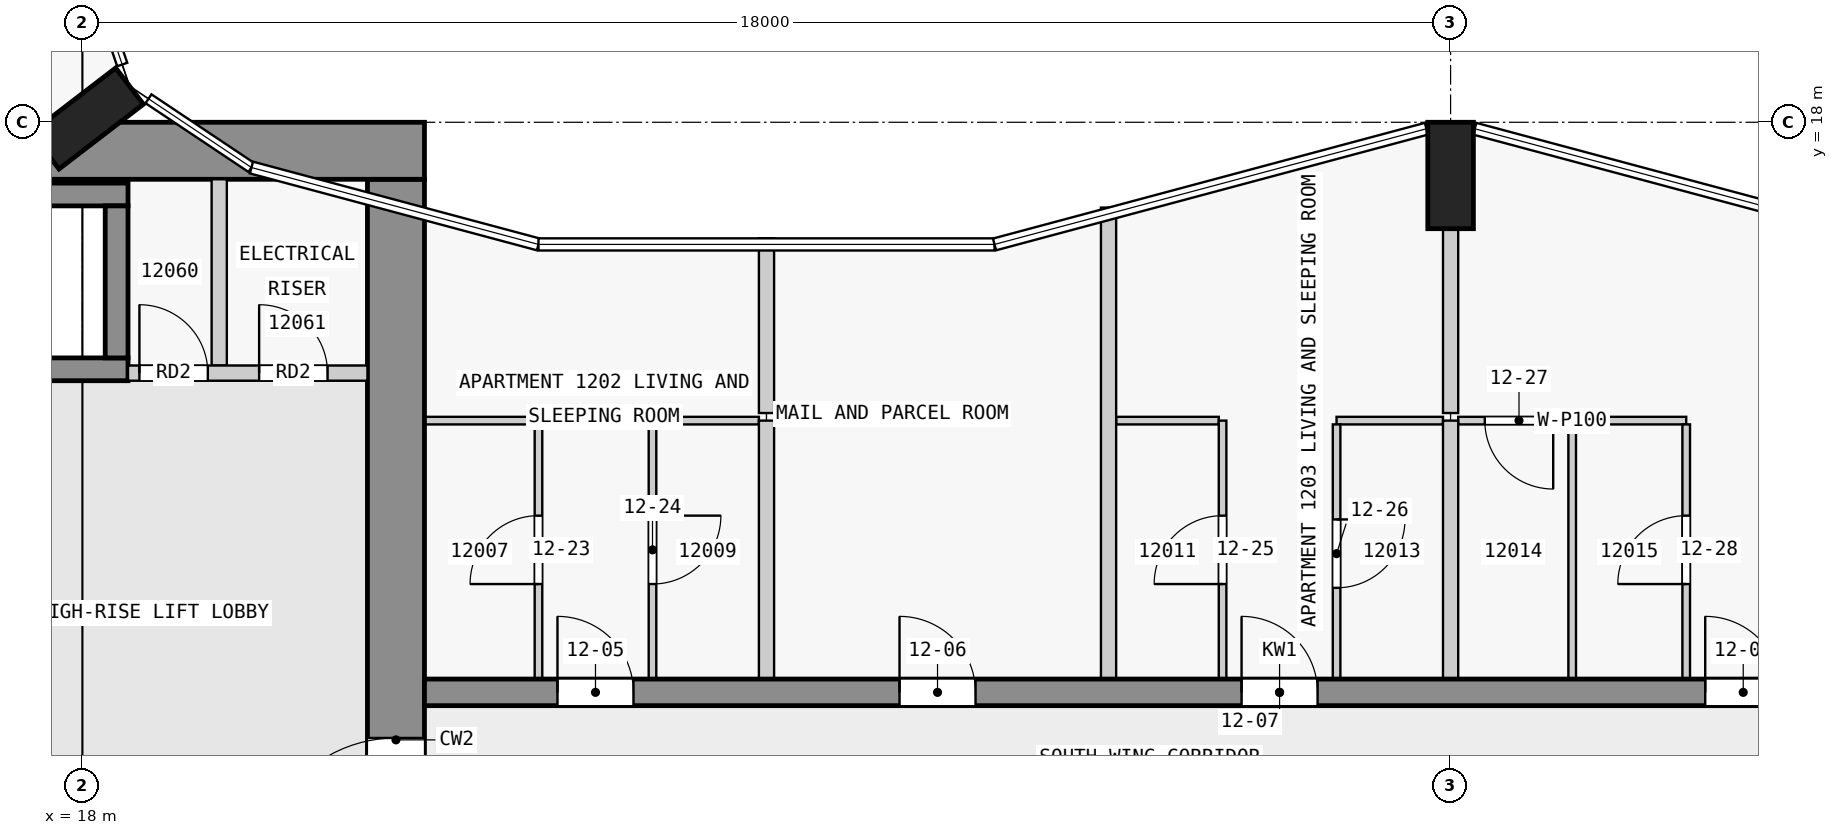
"""IFC4 building model, lengths in metres.
Left out: names, types, materials, properties, quantities, classifications, styles, units other than length and angle.
Written with IfcOpenShell. Run it as: python <this file> out.ifc"""

import sys

from ifc_helpers import new_model, si_unit, direction, frame, frame_2d, origin, origin_2d, place, context, subcontext, project, spatial, rectangle, extrude, element, fill, save


model = new_model("IFC4")
c1 = context("Model", 3, precision=1e-05, world=origin(), true_north=direction((0.0, 1.0)))
c2 = subcontext(c1, "Body", "Model", "MODEL_VIEW")
j1 = project(units=[si_unit("LENGTHUNIT", "METRE"), si_unit("PLANEANGLEUNIT", "RADIAN")], contexts=[c1])
p1 = place(None, origin())
s1 = spatial("IfcSite", under=j1, at=p1, CompositionType="ELEMENT")
p2 = place(p1, origin())
s2 = spatial("IfcBuilding", under=s1, at=p2, CompositionType="ELEMENT")
p3 = place(p2, frame((0.0, 0.0, 51.3)))
s3 = spatial("IfcBuildingStorey", under=s2, at=p3, CompositionType="ELEMENT", Elevation=51.3)
for number, where, z_axis, x_axis in (
    (1, (36.0, 17.3, 0.0), (0.0, 0.0, 1.0), (1.0, 0.0, 0.0)),
    (2, (18.065, 18.05, 0.0), (0.0, 0.0, 1.0), (-0.609, 0.793, 0.0)),
):
    element("IfcColumn", number, at=place(p3, frame(where, z_axis=z_axis, x_axis=x_axis)), inside=s3, PredefinedType="COLUMN", context=c2, shape_type="SweptSolid", body=[
        extrude(rectangle(XDim=0.6, YDim=1.4, at=origin_2d()), origin(), (0.0, 0.0, 1.0), 3.5),
    ])
p4 = place(p3, frame((1.55, 17.625, 0.0), z_axis=(0.0, 0.0, 1.0), x_axis=(1.0, 0.0, 0.0)))
e3 = element("IfcWall", 3, at=p4, inside=s3, PredefinedType="SHEAR", context=c2, shape_type="SweptSolid", body=[
    extrude(rectangle(XDim=20.95, YDim=0.75, at=frame_2d((10.475, 0.0))), origin(), (0.0, 0.0, 1.0), 3.25),
])
p5 = place(p4, frame((6.55, 0.0, 0.0)))
e4 = element("IfcOpeningElement", 4, at=p5, cuts=e3, PredefinedType="OPENING", context=c2, shape_type="SweptSolid", body=[
    extrude(rectangle(XDim=1.8, YDim=2.1, at=frame_2d((0.9, 1.05))), frame((0.0, 0.385, 0.0), z_axis=(0.0, -1.0, 0.0), x_axis=(1.0, 0.0, 0.0)), (0.0, 0.0, 1.0), 0.77),
])
p6 = place(p3, frame((22.125, 2.5, 0.0), z_axis=(0.0, 0.0, 1.0), x_axis=(0.0, 1.0, 0.0)))
e5 = element("IfcWall", 5, at=p6, inside=s3, PredefinedType="SHEAR", context=c2, shape_type="SweptSolid", body=[
    extrude(rectangle(XDim=14.75, YDim=0.75, at=frame_2d((7.375, 0.0))), origin(), (0.0, 0.0, 1.0), 3.25),
])
p7 = place(p6, frame((5.6, 0.0, 0.0)))
e6 = element("IfcOpeningElement", 6, at=p7, cuts=e5, PredefinedType="OPENING", context=c2, shape_type="SweptSolid", body=[
    extrude(rectangle(XDim=1.8, YDim=2.1, at=frame_2d((0.9, 1.05))), frame((0.0, 0.385, 0.0), z_axis=(0.0, -1.0, 0.0), x_axis=(1.0, 0.0, 0.0)), (0.0, 0.0, 1.0), 0.77),
])
for number, where, z_axis, x_axis in (
    (7, (10.8, 17.05, 0.0), (0.0, 0.0, 1.0), (1.0, 0.0, 0.0)),
    (8, (10.8, 14.75, 0.0), (0.0, 0.0, 1.0), (1.0, 0.0, 0.0)),
):
    element("IfcWall", number, at=place(p3, frame(where, z_axis=z_axis, x_axis=x_axis)), inside=s3, PredefinedType="SHEAR", context=c2, shape_type="SweptSolid", body=[
        extrude(rectangle(XDim=7.8, YDim=0.3, at=frame_2d((3.9, 0.0))), origin(), (0.0, 0.0, 1.0), 3.25),
    ])
p8 = place(p3, frame((18.45, 14.9, 0.0), z_axis=(0.0, 0.0, 1.0), x_axis=(0.0, 1.0, 0.0)))
e9 = element("IfcWall", 9, at=p8, inside=s3, PredefinedType="SHEAR", context=c2, shape_type="SweptSolid", body=[
    extrude(rectangle(XDim=2.0, YDim=0.3, at=frame_2d((1.0, 0.0))), origin(), (0.0, 0.0, 1.0), 3.25),
])
p9 = place(p3, frame((22.5, 10.5, 0.0), z_axis=(0.0, 0.0, 1.0), x_axis=(1.0, 0.0, 0.0)))
e10 = element("IfcWall", 10, at=p9, inside=s3, PredefinedType="SHEAR", context=c2, shape_type="SweptSolid", body=[
    extrude(rectangle(XDim=22.5, YDim=0.35, at=frame_2d((11.25, 0.0))), origin(), (0.0, 0.0, 1.0), 3.25),
])
p10 = place(p9, frame((1.75, 0.0, 0.0)))
e11 = element("IfcOpeningElement", 11, at=p10, cuts=e10, PredefinedType="OPENING", context=c2, shape_type="SweptSolid", body=[
    extrude(rectangle(XDim=1.0, YDim=2.1, at=frame_2d((0.5, 1.05))), frame((0.0, 0.185, 0.0), z_axis=(0.0, -1.0, 0.0), x_axis=(1.0, 0.0, 0.0)), (0.0, 0.0, 1.0), 0.37),
])
p11 = place(p9, frame((6.25, 0.0, 0.0)))
e12 = element("IfcOpeningElement", 12, at=p11, cuts=e10, PredefinedType="OPENING", context=c2, shape_type="SweptSolid", body=[
    extrude(rectangle(XDim=1.0, YDim=2.1, at=frame_2d((0.5, 1.05))), frame((0.0, 0.185, 0.0), z_axis=(0.0, -1.0, 0.0), x_axis=(1.0, 0.0, 0.0)), (0.0, 0.0, 1.0), 0.37),
])
p12 = place(p9, frame((10.75, 0.0, 0.0)))
e13 = element("IfcOpeningElement", 13, at=p12, cuts=e10, PredefinedType="OPENING", context=c2, shape_type="SweptSolid", body=[
    extrude(rectangle(XDim=1.0, YDim=2.1, at=frame_2d((0.5, 1.05))), frame((0.0, 0.185, 0.0), z_axis=(0.0, -1.0, 0.0), x_axis=(1.0, 0.0, 0.0)), (0.0, 0.0, 1.0), 0.37),
])
p13 = place(p9, frame((16.85, 0.0, 0.0)))
e14 = element("IfcOpeningElement", 14, at=p13, cuts=e10, PredefinedType="OPENING", context=c2, shape_type="SweptSolid", body=[
    extrude(rectangle(XDim=1.0, YDim=2.1, at=frame_2d((0.5, 1.05))), frame((0.0, 0.185, 0.0), z_axis=(0.0, -1.0, 0.0), x_axis=(1.0, 0.0, 0.0)), (0.0, 0.0, 1.0), 0.37),
])
p14 = place(p3, frame((18.6, 14.7, 0.0), z_axis=(0.0, 0.0, 1.0), x_axis=(1.0, 0.0, 0.0)))
e15 = element("IfcWall", 15, at=p14, inside=s3, PredefinedType="PARTITIONING", context=c2, shape_type="SweptSolid", body=[
    extrude(rectangle(XDim=3.15, YDim=0.2, at=frame_2d((1.575, 0.0))), origin(), (0.0, 0.0, 1.0), 3.25),
])
p15 = place(p14, frame((0.15, 0.0, 0.0)))
e16 = element("IfcOpeningElement", 16, at=p15, cuts=e15, PredefinedType="OPENING", context=c2, shape_type="SweptSolid", body=[
    extrude(rectangle(XDim=0.9, YDim=2.1, at=frame_2d((0.45, 1.05))), frame((0.0, 0.11, 0.0), z_axis=(0.0, -1.0, 0.0), x_axis=(1.0, 0.0, 0.0)), (0.0, 0.0, 1.0), 0.22),
])
p16 = place(p14, frame((1.725, 0.0, 0.0)))
e17 = element("IfcOpeningElement", 17, at=p16, cuts=e15, PredefinedType="OPENING", context=c2, shape_type="SweptSolid", body=[
    extrude(rectangle(XDim=0.9, YDim=2.1, at=frame_2d((0.45, 1.05))), frame((0.0, 0.11, 0.0), z_axis=(0.0, -1.0, 0.0), x_axis=(1.0, 0.0, 0.0)), (0.0, 0.0, 1.0), 0.22),
])
p17 = place(p3, frame((19.8, 14.8, 0.0), z_axis=(0.0, 0.0, 1.0), x_axis=(0.0, 1.0, 0.0)))
e18 = element("IfcWall", 18, at=p17, inside=s3, PredefinedType="PARTITIONING", context=c2, shape_type="SweptSolid", body=[
    extrude(rectangle(XDim=2.45, YDim=0.2, at=frame_2d((1.225, 0.0))), origin(), (0.0, 0.0, 1.0), 3.25),
])
p18 = place(p3, frame((23.95, 14.075, 0.0), z_axis=(0.0, 0.0, 1.0), x_axis=(-1.0, 0.0, 0.0)))
e19 = element("IfcWall", 19, at=p18, inside=s3, PredefinedType="PARTITIONING", context=c2, shape_type="SweptSolid", body=[
    extrude(rectangle(XDim=1.45, YDim=0.1, at=frame_2d((0.725, 0.0))), origin(), (0.0, 0.0, 1.0), 3.25),
])
for number, where, z_axis, x_axis in (
    (20, (26.9, 14.075, 0.0), (0.0, 0.0, 1.0), (-1.0, 0.0, 0.0)),
    (21, (32.95, 14.075, 0.0), (0.0, 0.0, 1.0), (-1.0, 0.0, 0.0)),
):
    element("IfcWall", number, at=place(p3, frame(where, z_axis=z_axis, x_axis=x_axis)), inside=s3, PredefinedType="PARTITIONING", context=c2, shape_type="SweptSolid", body=[
        extrude(rectangle(XDim=1.35, YDim=0.1, at=frame_2d((0.675, 0.0))), origin(), (0.0, 0.0, 1.0), 3.25),
    ])
p19 = place(p3, frame((35.9, 14.075, 0.0), z_axis=(0.0, 0.0, 1.0), x_axis=(-1.0, 0.0, 0.0)))
e22 = element("IfcWall", 22, at=p19, inside=s3, PredefinedType="PARTITIONING", context=c2, shape_type="SweptSolid", body=[
    extrude(rectangle(XDim=1.4, YDim=0.1, at=frame_2d((0.7, 0.0))), origin(), (0.0, 0.0, 1.0), 3.25),
])
p20 = place(p3, frame((39.1, 14.075, 0.0), z_axis=(0.0, 0.0, 1.0), x_axis=(-1.0, 0.0, 0.0)))
e23 = element("IfcWall", 23, at=p20, inside=s3, PredefinedType="PARTITIONING", context=c2, shape_type="SweptSolid", body=[
    extrude(rectangle(XDim=3.0, YDim=0.1, at=frame_2d((1.5, 0.0))), origin(), (0.0, 0.0, 1.0), 3.25),
])
p21 = place(p20, frame((1.75, 0.0, 0.0)))
e24 = element("IfcOpeningElement", 24, at=p21, cuts=e23, PredefinedType="OPENING", context=c2, shape_type="SweptSolid", body=[
    extrude(rectangle(XDim=0.9, YDim=2.1, at=frame_2d((0.45, 1.05))), frame((0.0, 0.06, 0.0), z_axis=(0.0, -1.0, 0.0), x_axis=(1.0, 0.0, 0.0)), (0.0, 0.0, 1.0), 0.12),
])
p22 = place(p3, frame((24.0, 10.675, 0.0), z_axis=(0.0, 0.0, 1.0), x_axis=(0.0, 1.0, 0.0)))
e25 = element("IfcWall", 25, at=p22, inside=s3, PredefinedType="PARTITIONING", context=c2, shape_type="SweptSolid", body=[
    extrude(rectangle(XDim=3.4, YDim=0.1, at=frame_2d((1.7, 0.0))), origin(), (0.0, 0.0, 1.0), 3.25),
])
p23 = place(p22, frame((1.25, 0.0, 0.0)))
e26 = element("IfcOpeningElement", 26, at=p23, cuts=e25, PredefinedType="OPENING", context=c2, shape_type="SweptSolid", body=[
    extrude(rectangle(XDim=0.9, YDim=2.1, at=frame_2d((0.45, 1.05))), frame((0.0, 0.06, 0.0), z_axis=(0.0, -1.0, 0.0), x_axis=(1.0, 0.0, 0.0)), (0.0, 0.0, 1.0), 0.12),
])
p24 = place(p3, frame((25.5, 14.075, 0.0), z_axis=(0.0, 0.0, 1.0), x_axis=(0.0, -1.0, 0.0)))
e27 = element("IfcWall", 27, at=p24, inside=s3, PredefinedType="PARTITIONING", context=c2, shape_type="SweptSolid", body=[
    extrude(rectangle(XDim=3.4, YDim=0.1, at=frame_2d((1.7, 0.0))), origin(), (0.0, 0.0, 1.0), 3.25),
])
p25 = place(p24, frame((1.25, 0.0, 0.0)))
e28 = element("IfcOpeningElement", 28, at=p25, cuts=e27, PredefinedType="OPENING", context=c2, shape_type="SweptSolid", body=[
    extrude(rectangle(XDim=0.9, YDim=2.1, at=frame_2d((0.45, 1.05))), frame((0.0, 0.06, 0.0), z_axis=(0.0, -1.0, 0.0), x_axis=(1.0, 0.0, 0.0)), (0.0, 0.0, 1.0), 0.12),
])
p26 = place(p3, frame((27.0, 16.473, 0.0), z_axis=(0.0, 0.0, 1.0), x_axis=(0.0, -1.0, 0.0)))
e29 = element("IfcWall", 29, at=p26, inside=s3, PredefinedType="PARTITIONING", context=c2, shape_type="SweptSolid", body=[
    extrude(rectangle(XDim=2.298, YDim=0.2, at=frame_2d((1.149, 0.0))), origin(), (0.0, 0.0, 1.0), 3.25),
])
p27 = place(p3, frame((27.0, 10.675, 0.0), z_axis=(0.0, 0.0, 1.0), x_axis=(0.0, 1.0, 0.0)))
e30 = element("IfcWall", 30, at=p27, inside=s3, PredefinedType="PARTITIONING", context=c2, shape_type="SweptSolid", body=[
    extrude(rectangle(XDim=3.4, YDim=0.2, at=frame_2d((1.7, 0.0))), origin(), (0.0, 0.0, 1.0), 3.25),
])
p28 = place(p3, frame((31.5, 10.675, 0.0), z_axis=(0.0, 0.0, 1.0), x_axis=(0.0, 1.0, 0.0)))
e31 = element("IfcWall", 31, at=p28, inside=s3, PredefinedType="PARTITIONING", context=c2, shape_type="SweptSolid", body=[
    extrude(rectangle(XDim=6.203, YDim=0.2, at=frame_2d((3.101, 0.0))), origin(), (0.0, 0.0, 1.0), 3.25),
])
p29 = place(p3, frame((33.0, 10.675, 0.0), z_axis=(0.0, 0.0, 1.0), x_axis=(0.0, 1.0, 0.0)))
e32 = element("IfcWall", 32, at=p29, inside=s3, PredefinedType="PARTITIONING", context=c2, shape_type="SweptSolid", body=[
    extrude(rectangle(XDim=3.4, YDim=0.1, at=frame_2d((1.7, 0.0))), origin(), (0.0, 0.0, 1.0), 3.25),
])
p30 = place(p29, frame((1.25, 0.0, 0.0)))
e33 = element("IfcOpeningElement", 33, at=p30, cuts=e32, PredefinedType="OPENING", context=c2, shape_type="SweptSolid", body=[
    extrude(rectangle(XDim=0.9, YDim=2.1, at=frame_2d((0.45, 1.05))), frame((0.0, 0.06, 0.0), z_axis=(0.0, -1.0, 0.0), x_axis=(1.0, 0.0, 0.0)), (0.0, 0.0, 1.0), 0.12),
])
p31 = place(p3, frame((34.5, 14.025, 0.0), z_axis=(0.0, 0.0, 1.0), x_axis=(0.0, -1.0, 0.0)))
e34 = element("IfcWall", 34, at=p31, inside=s3, PredefinedType="PARTITIONING", context=c2, shape_type="SweptSolid", body=[
    extrude(rectangle(XDim=3.35, YDim=0.1, at=frame_2d((1.675, 0.0))), origin(), (0.0, 0.0, 1.0), 3.25),
])
p32 = place(p31, frame((1.25, 0.0, 0.0)))
e35 = element("IfcOpeningElement", 35, at=p32, cuts=e34, PredefinedType="OPENING", context=c2, shape_type="SweptSolid", body=[
    extrude(rectangle(XDim=0.9, YDim=2.1, at=frame_2d((0.45, 1.05))), frame((0.0, 0.06, 0.0), z_axis=(0.0, -1.0, 0.0), x_axis=(1.0, 0.0, 0.0)), (0.0, 0.0, 1.0), 0.12),
])
p33 = place(p3, frame((36.0, 16.6, 0.0), z_axis=(0.0, 0.0, 1.0), x_axis=(0.0, -1.0, 0.0)))
e36 = element("IfcWall", 36, at=p33, inside=s3, PredefinedType="PARTITIONING", context=c2, shape_type="SweptSolid", body=[
    extrude(rectangle(XDim=2.425, YDim=0.2, at=frame_2d((1.212, 0.0))), origin(), (0.0, 0.0, 1.0), 3.25),
])
p34 = place(p3, frame((36.0, 10.675, 0.0), z_axis=(0.0, 0.0, 1.0), x_axis=(0.0, 1.0, 0.0)))
e37 = element("IfcWall", 37, at=p34, inside=s3, PredefinedType="PARTITIONING", context=c2, shape_type="SweptSolid", body=[
    extrude(rectangle(XDim=3.4, YDim=0.2, at=frame_2d((1.7, 0.0))), origin(), (0.0, 0.0, 1.0), 3.25),
])
p35 = place(p3, frame((37.6, 10.675, 0.0), z_axis=(0.0, 0.0, 1.0), x_axis=(0.0, 1.0, 0.0)))
e38 = element("IfcWall", 38, at=p35, inside=s3, PredefinedType="PARTITIONING", context=c2, shape_type="SweptSolid", body=[
    extrude(rectangle(XDim=3.35, YDim=0.1, at=frame_2d((1.675, 0.0))), origin(), (0.0, 0.0, 1.0), 3.25),
])
p36 = place(p3, frame((39.1, 10.675, 0.0), z_axis=(0.0, 0.0, 1.0), x_axis=(0.0, 1.0, 0.0)))
e39 = element("IfcWall", 39, at=p36, inside=s3, PredefinedType="PARTITIONING", context=c2, shape_type="SweptSolid", body=[
    extrude(rectangle(XDim=3.35, YDim=0.1, at=frame_2d((1.675, 0.0))), origin(), (0.0, 0.0, 1.0), 3.25),
])
p37 = place(p36, frame((1.25, 0.0, 0.0)))
e40 = element("IfcOpeningElement", 40, at=p37, cuts=e39, PredefinedType="OPENING", context=c2, shape_type="SweptSolid", body=[
    extrude(rectangle(XDim=0.9, YDim=2.1, at=frame_2d((0.45, 1.05))), frame((0.0, 0.06, 0.0), z_axis=(0.0, -1.0, 0.0), x_axis=(1.0, 0.0, 0.0)), (0.0, 0.0, 1.0), 0.12),
])
p38 = place(p7, origin())
e41 = element("IfcDoor", 41, at=p38, inside=s3, OperationType="DOUBLE_DOOR_SINGLE_SWING", PredefinedType="DOOR", context=c2, shape_type="SweptSolid", body=[
    extrude(rectangle(XDim=1.8, YDim=2.1, at=frame_2d((0.9, 1.05))), frame((0.0, 0.025, 0.0), z_axis=(0.0, -1.0, 0.0), x_axis=(1.0, 0.0, 0.0)), (0.0, 0.0, 1.0), 0.05),
])
fill(e6, e41)
p39 = place(p15, origin())
e42 = element("IfcDoor", 42, at=p39, inside=s3, OperationType="SINGLE_SWING_LEFT", PredefinedType="DOOR", context=c2, shape_type="SweptSolid", body=[
    extrude(rectangle(XDim=0.9, YDim=2.1, at=frame_2d((0.45, 1.05))), frame((0.0, 0.025, 0.0), z_axis=(0.0, -1.0, 0.0), x_axis=(1.0, 0.0, 0.0)), (0.0, 0.0, 1.0), 0.05),
])
fill(e16, e42)
p40 = place(p16, origin())
e43 = element("IfcDoor", 43, at=p40, inside=s3, OperationType="SINGLE_SWING_LEFT", PredefinedType="DOOR", context=c2, shape_type="SweptSolid", body=[
    extrude(rectangle(XDim=0.9, YDim=2.1, at=frame_2d((0.45, 1.05))), frame((0.0, 0.025, 0.0), z_axis=(0.0, -1.0, 0.0), x_axis=(1.0, 0.0, 0.0)), (0.0, 0.0, 1.0), 0.05),
])
fill(e17, e43)
p41 = place(p10, origin())
e44 = element("IfcDoor", 44, at=p41, inside=s3, OperationType="SINGLE_SWING_LEFT", PredefinedType="DOOR", context=c2, shape_type="SweptSolid", body=[
    extrude(rectangle(XDim=1.0, YDim=2.1, at=frame_2d((0.5, 1.05))), frame((0.0, 0.025, 0.0), z_axis=(0.0, -1.0, 0.0), x_axis=(1.0, 0.0, 0.0)), (0.0, 0.0, 1.0), 0.05),
])
fill(e11, e44)
p42 = place(p11, origin())
e45 = element("IfcDoor", 45, at=p42, inside=s3, OperationType="SINGLE_SWING_LEFT", PredefinedType="DOOR", context=c2, shape_type="SweptSolid", body=[
    extrude(rectangle(XDim=1.0, YDim=2.1, at=frame_2d((0.5, 1.05))), frame((0.0, 0.025, 0.0), z_axis=(0.0, -1.0, 0.0), x_axis=(1.0, 0.0, 0.0)), (0.0, 0.0, 1.0), 0.05),
])
fill(e12, e45)
p43 = place(p12, origin())
e46 = element("IfcDoor", 46, at=p43, inside=s3, OperationType="SINGLE_SWING_LEFT", PredefinedType="DOOR", context=c2, shape_type="SweptSolid", body=[
    extrude(rectangle(XDim=1.0, YDim=2.1, at=frame_2d((0.5, 1.05))), frame((0.0, 0.025, 0.0), z_axis=(0.0, -1.0, 0.0), x_axis=(1.0, 0.0, 0.0)), (0.0, 0.0, 1.0), 0.05),
])
fill(e13, e46)
p44 = place(p13, origin())
e47 = element("IfcDoor", 47, at=p44, inside=s3, OperationType="SINGLE_SWING_RIGHT", PredefinedType="DOOR", context=c2, shape_type="SweptSolid", body=[
    extrude(rectangle(XDim=1.0, YDim=2.1, at=frame_2d((0.5, 1.05))), frame((0.0, 0.025, 0.0), z_axis=(0.0, -1.0, 0.0), x_axis=(1.0, 0.0, 0.0)), (0.0, 0.0, 1.0), 0.05),
])
fill(e14, e47)
p45 = place(p23, origin())
e48 = element("IfcDoor", 48, at=p45, inside=s3, OperationType="SINGLE_SWING_RIGHT", PredefinedType="DOOR", context=c2, shape_type="SweptSolid", body=[
    extrude(rectangle(XDim=0.9, YDim=2.1, at=frame_2d((0.45, 1.05))), frame((0.0, 0.025, 0.0), z_axis=(0.0, -1.0, 0.0), x_axis=(1.0, 0.0, 0.0)), (0.0, 0.0, 1.0), 0.05),
])
fill(e26, e48)
p46 = place(p25, origin())
e49 = element("IfcDoor", 49, at=p46, inside=s3, OperationType="SINGLE_SWING_RIGHT", PredefinedType="DOOR", context=c2, shape_type="SweptSolid", body=[
    extrude(rectangle(XDim=0.9, YDim=2.1, at=frame_2d((0.45, 1.05))), frame((0.0, 0.025, 0.0), z_axis=(0.0, -1.0, 0.0), x_axis=(1.0, 0.0, 0.0)), (0.0, 0.0, 1.0), 0.05),
])
fill(e28, e49)
p47 = place(p30, origin())
e50 = element("IfcDoor", 50, at=p47, inside=s3, OperationType="SINGLE_SWING_RIGHT", PredefinedType="DOOR", context=c2, shape_type="SweptSolid", body=[
    extrude(rectangle(XDim=0.9, YDim=2.1, at=frame_2d((0.45, 1.05))), frame((0.0, 0.025, 0.0), z_axis=(0.0, -1.0, 0.0), x_axis=(1.0, 0.0, 0.0)), (0.0, 0.0, 1.0), 0.05),
])
fill(e33, e50)
p48 = place(p32, origin())
e51 = element("IfcDoor", 51, at=p48, inside=s3, OperationType="SINGLE_SWING_RIGHT", PredefinedType="DOOR", context=c2, shape_type="SweptSolid", body=[
    extrude(rectangle(XDim=0.9, YDim=2.1, at=frame_2d((0.45, 1.05))), frame((0.0, 0.025, 0.0), z_axis=(0.0, -1.0, 0.0), x_axis=(1.0, 0.0, 0.0)), (0.0, 0.0, 1.0), 0.05),
])
fill(e35, e51)
p49 = place(p21, origin())
e52 = element("IfcDoor", 52, at=p49, inside=s3, OperationType="SINGLE_SWING_RIGHT", PredefinedType="DOOR", context=c2, shape_type="SweptSolid", body=[
    extrude(rectangle(XDim=0.9, YDim=2.1, at=frame_2d((0.45, 1.05))), frame((0.0, 0.025, 0.0), z_axis=(0.0, -1.0, 0.0), x_axis=(1.0, 0.0, 0.0)), (0.0, 0.0, 1.0), 0.05),
])
fill(e24, e52)
p50 = place(p37, origin())
e53 = element("IfcDoor", 53, at=p50, inside=s3, OperationType="SINGLE_SWING_RIGHT", PredefinedType="DOOR", context=c2, shape_type="SweptSolid", body=[
    extrude(rectangle(XDim=0.9, YDim=2.1, at=frame_2d((0.45, 1.05))), frame((0.0, 0.025, 0.0), z_axis=(0.0, -1.0, 0.0), x_axis=(1.0, 0.0, 0.0)), (0.0, 0.0, 1.0), 0.05),
])
fill(e40, e53)
save(model, sys.argv[1])
